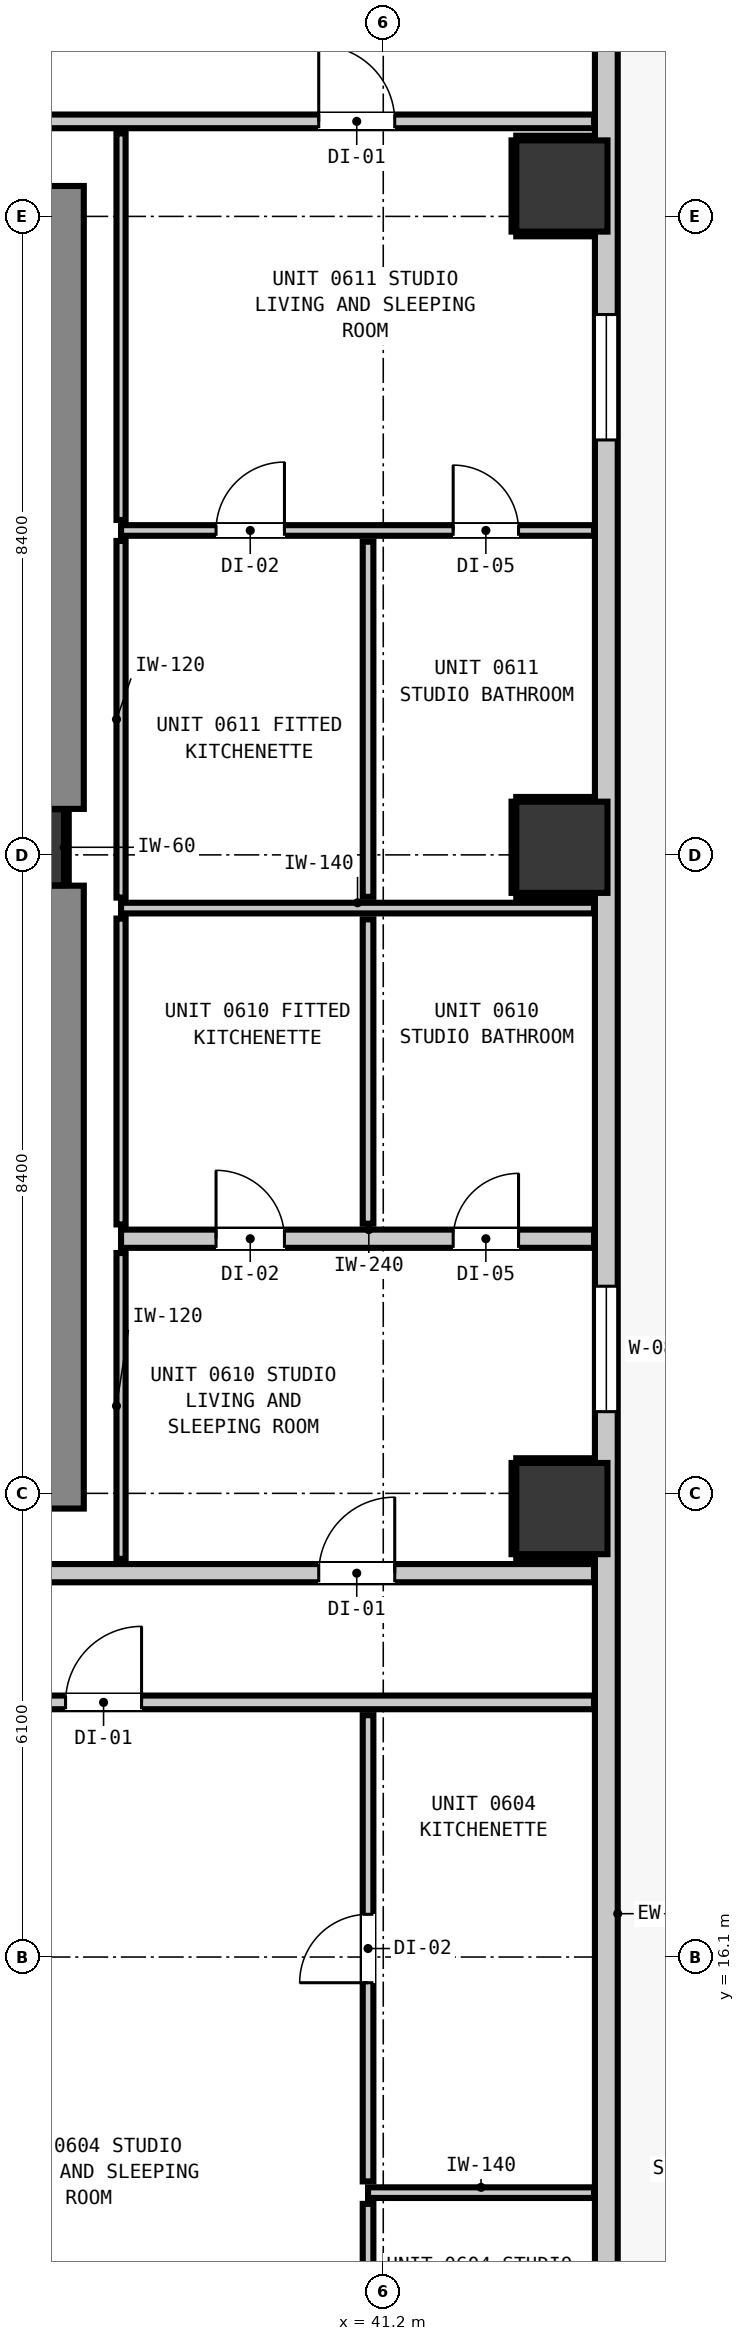
"""IFC4 building model, lengths in metres.
Left out: names, types, materials, properties, quantities, classifications, styles, units other than length and angle.
Written with IfcOpenShell. Run it as: python <this file> out.ifc"""

import sys

from ifc_helpers import new_model, si_unit, direction, frame, frame_2d, origin, origin_2d, place, context, subcontext, project, spatial, rectangle, extrude, element, fill, save


model = new_model("IFC4")
c1 = context("Model", 3, precision=1e-05, world=origin(), true_north=direction((0.0, 1.0)))
c2 = subcontext(c1, "Body", "Model", "MODEL_VIEW")
j1 = project(units=[si_unit("LENGTHUNIT", "METRE"), si_unit("PLANEANGLEUNIT", "RADIAN")], contexts=[c1])
p1 = place(None, origin())
s1 = spatial("IfcSite", under=j1, at=p1, CompositionType="ELEMENT")
p2 = place(p1, origin())
s2 = spatial("IfcBuilding", under=s1, at=p2, CompositionType="ELEMENT")
p3 = place(p2, frame((0.0, 0.0, 25.32)))
s3 = spatial("IfcBuildingStorey", under=s2, at=p3, CompositionType="ELEMENT", Elevation=25.32)
p4 = place(p3, frame((36.5, 30.7, 0.0), z_axis=(0.0, 0.0, 1.0), x_axis=(1.0, 0.0, 0.0)))
e1 = element("IfcColumn", 1, at=p4, inside=s3, PredefinedType="COLUMN", context=c2, shape_type="SweptSolid", body=[
    extrude(rectangle(XDim=1.0, YDim=1.0, at=origin_2d()), origin(), (0.0, 0.0, 1.0), 3.32),
])
p5 = place(p3, frame((36.66, 22.0, 0.0), z_axis=(0.0, 0.0, 1.0), x_axis=(0.0, 1.0, 0.0)))
e2 = element("IfcWall", 2, at=p5, inside=s3, PredefinedType="SHEAR", context=c2, shape_type="SweptSolid", body=[
    extrude(rectangle(XDim=8.195, YDim=1.2, at=frame_2d((4.098, 0.0))), origin(), (0.0, 0.0, 1.0), 3.32),
])
p6 = place(p3, frame((36.66, 31.205, 0.0), z_axis=(0.0, 0.0, 1.0), x_axis=(0.0, 1.0, 0.0)))
e3 = element("IfcWall", 3, at=p6, inside=s3, PredefinedType="SHEAR", context=c2, shape_type="SweptSolid", body=[
    extrude(rectangle(XDim=8.195, YDim=1.2, at=frame_2d((4.097, 0.0))), origin(), (0.0, 0.0, 1.0), 3.32),
])
for number, where, z_axis, x_axis in (
    (4, (43.55, 22.0, 0.0), (0.0, 0.0, 1.0), (1.0, 0.0, 0.0)),
    (5, (43.55, 30.7, 0.0), (0.0, 0.0, 1.0), (1.0, 0.0, 0.0)),
    (6, (43.55, 39.4, 0.0), (0.0, 0.0, 1.0), (1.0, 0.0, 0.0)),
):
    element("IfcColumn", number, at=place(p3, frame(where, z_axis=z_axis, x_axis=x_axis)), inside=s3, PredefinedType="COLUMN", context=c2, shape_type="SweptSolid", body=[
        extrude(rectangle(XDim=1.2, YDim=1.2, at=origin_2d()), origin(), (0.0, 0.0, 1.0), 3.32),
    ])
p7 = place(p3, frame((44.135, 44.835, 0.0), z_axis=(0.0, 0.0, 1.0), x_axis=(0.0, -1.0, 0.0)))
e7 = element("IfcWall", 7, at=p7, inside=s3, PredefinedType="STANDARD", context=c2, shape_type="SweptSolid", body=[
    extrude(rectangle(XDim=34.67, YDim=0.3, at=frame_2d((17.335, 0.0))), origin(), (0.0, 0.0, 1.0), 3.06),
])
p8 = place(p7, frame((0.901, 0.0, 0.0)))
e8 = element("IfcOpeningElement", 8, at=p8, cuts=e7, PredefinedType="OPENING", context=c2, shape_type="SweptSolid", body=[
    extrude(rectangle(XDim=1.0, YDim=2.15, at=frame_2d((0.5, 1.075))), frame((0.0, 0.16, 0.0), z_axis=(0.0, -1.0, 0.0), x_axis=(1.0, 0.0, 0.0)), (0.0, 0.0, 1.0), 0.32),
])
p9 = place(p7, frame((19.91, 0.0, 0.85)))
e9 = element("IfcOpeningElement", 9, at=p9, cuts=e7, PredefinedType="OPENING", context=c2, shape_type="SweptSolid", body=[
    extrude(rectangle(XDim=1.65, YDim=1.75, at=frame_2d((0.825, 0.875))), frame((0.0, 0.16, 0.0), z_axis=(0.0, -1.0, 0.0), x_axis=(1.0, 0.0, 0.0)), (0.0, 0.0, 1.0), 0.32),
])
p10 = place(p7, frame((7.126, 0.0, 0.85)))
e10 = element("IfcOpeningElement", 10, at=p10, cuts=e7, PredefinedType="OPENING", context=c2, shape_type="SweptSolid", body=[
    extrude(rectangle(XDim=1.65, YDim=1.75, at=frame_2d((0.825, 0.875))), frame((0.0, 0.16, 0.0), z_axis=(0.0, -1.0, 0.0), x_axis=(1.0, 0.0, 0.0)), (0.0, 0.0, 1.0), 0.32),
])
p11 = place(p3, frame((1.827, 21.15, 0.0), z_axis=(0.0, 0.0, 1.0), x_axis=(1.0, 0.0, 0.0)))
e11 = element("IfcWall", 11, at=p11, inside=s3, PredefinedType="PARTITIONING", context=c2, shape_type="SweptSolid", body=[
    extrude(rectangle(XDim=42.146, YDim=0.24, at=frame_2d((21.073, 0.0))), origin(), (0.0, 0.0, 1.0), 3.06),
])
p12 = place(p11, frame((16.383, 0.0, 0.0)))
e12 = element("IfcOpeningElement", 12, at=p12, cuts=e11, PredefinedType="OPENING", context=c2, shape_type="SweptSolid", body=[
    extrude(rectangle(XDim=1.1, YDim=2.15, at=frame_2d((0.55, 1.075))), frame((0.0, 0.13, 0.0), z_axis=(0.0, -1.0, 0.0), x_axis=(1.0, 0.0, 0.0)), (0.0, 0.0, 1.0), 0.26),
])
p13 = place(p11, frame((8.647, 0.0, 0.0)))
e13 = element("IfcOpeningElement", 13, at=p13, cuts=e11, PredefinedType="OPENING", context=c2, shape_type="SweptSolid", body=[
    extrude(rectangle(XDim=1.4, YDim=2.15, at=frame_2d((0.7, 1.075))), frame((0.0, 0.13, 0.0), z_axis=(0.0, -1.0, 0.0), x_axis=(1.0, 0.0, 0.0)), (0.0, 0.0, 1.0), 0.26),
])
p14 = place(p11, frame((38.524, 0.0, 0.0)))
e14 = element("IfcOpeningElement", 14, at=p14, cuts=e11, PredefinedType="OPENING", context=c2, shape_type="SweptSolid", body=[
    extrude(rectangle(XDim=1.0, YDim=2.15, at=frame_2d((0.5, 1.075))), frame((0.0, 0.13, 0.0), z_axis=(0.0, -1.0, 0.0), x_axis=(1.0, 0.0, 0.0)), (0.0, 0.0, 1.0), 0.26),
])
p15 = place(p3, frame((37.75, 25.55, 0.0), z_axis=(0.0, 0.0, 1.0), x_axis=(1.0, 0.0, 0.0)))
e15 = element("IfcWall", 15, at=p15, inside=s3, PredefinedType="PARTITIONING", context=c2, shape_type="SweptSolid", body=[
    extrude(rectangle(XDim=6.223, YDim=0.24, at=frame_2d((3.111, 0.0))), origin(), (0.0, 0.0, 1.0), 3.06),
])
p16 = place(p15, frame((1.25, 0.0, 0.0)))
e16 = element("IfcOpeningElement", 16, at=p16, cuts=e15, PredefinedType="OPENING", context=c2, shape_type="SweptSolid", body=[
    extrude(rectangle(XDim=0.9, YDim=2.1, at=frame_2d((0.45, 1.05))), frame((0.0, 0.13, 0.0), z_axis=(0.0, -1.0, 0.0), x_axis=(1.0, 0.0, 0.0)), (0.0, 0.0, 1.0), 0.26),
])
p17 = place(p15, frame((4.37, 0.0, 0.0)))
e17 = element("IfcOpeningElement", 17, at=p17, cuts=e15, PredefinedType="OPENING", context=c2, shape_type="SweptSolid", body=[
    extrude(rectangle(XDim=0.86, YDim=2.02, at=frame_2d((0.43, 1.01))), frame((0.0, 0.13, 0.0), z_axis=(0.0, -1.0, 0.0), x_axis=(1.0, 0.0, 0.0)), (0.0, 0.0, 1.0), 0.26),
])
p18 = place(p3, frame((1.827, 19.45, 0.0), z_axis=(0.0, 0.0, 1.0), x_axis=(1.0, 0.0, 0.0)))
e18 = element("IfcWall", 18, at=p18, inside=s3, PredefinedType="PARTITIONING", context=c2, shape_type="SweptSolid", body=[
    extrude(rectangle(XDim=42.146, YDim=0.18, at=frame_2d((21.073, 0.0))), origin(), (0.0, 0.0, 1.0), 3.06),
])
p19 = place(p18, frame((10.283, 0.0, 0.0)))
e19 = element("IfcOpeningElement", 19, at=p19, cuts=e18, PredefinedType="OPENING", context=c2, shape_type="SweptSolid", body=[
    extrude(rectangle(XDim=1.0, YDim=2.15, at=frame_2d((0.5, 1.075))), frame((0.0, 0.1, 0.0), z_axis=(0.0, -1.0, 0.0), x_axis=(1.0, 0.0, 0.0)), (0.0, 0.0, 1.0), 0.2),
])
p20 = place(p18, frame((17.475, 0.0, 0.0)))
e20 = element("IfcOpeningElement", 20, at=p20, cuts=e18, PredefinedType="OPENING", context=c2, shape_type="SweptSolid", body=[
    extrude(rectangle(XDim=1.0, YDim=2.15, at=frame_2d((0.5, 1.075))), frame((0.0, 0.1, 0.0), z_axis=(0.0, -1.0, 0.0), x_axis=(1.0, 0.0, 0.0)), (0.0, 0.0, 1.0), 0.2),
])
p21 = place(p18, frame((25.928, 0.0, 0.0)))
e21 = element("IfcOpeningElement", 21, at=p21, cuts=e18, PredefinedType="OPENING", context=c2, shape_type="SweptSolid", body=[
    extrude(rectangle(XDim=1.0, YDim=2.15, at=frame_2d((0.5, 1.075))), frame((0.0, 0.1, 0.0), z_axis=(0.0, -1.0, 0.0), x_axis=(1.0, 0.0, 0.0)), (0.0, 0.0, 1.0), 0.2),
])
p22 = place(p18, frame((35.193, 0.0, 0.0)))
e22 = element("IfcOpeningElement", 22, at=p22, cuts=e18, PredefinedType="OPENING", context=c2, shape_type="SweptSolid", body=[
    extrude(rectangle(XDim=1.0, YDim=2.15, at=frame_2d((0.5, 1.075))), frame((0.0, 0.1, 0.0), z_axis=(0.0, -1.0, 0.0), x_axis=(1.0, 0.0, 0.0)), (0.0, 0.0, 1.0), 0.2),
])
p23 = place(p3, frame((12.989, 40.25, 0.0), z_axis=(0.0, 0.0, 1.0), x_axis=(1.0, 0.0, 0.0)))
e23 = element("IfcWall", 23, at=p23, inside=s3, PredefinedType="PARTITIONING", context=c2, shape_type="SweptSolid", body=[
    extrude(rectangle(XDim=30.984, YDim=0.18, at=frame_2d((15.492, 0.0))), origin(), (0.0, 0.0, 1.0), 3.06),
])
p24 = place(p23, frame((4.446, 0.0, 0.0)))
e24 = element("IfcOpeningElement", 24, at=p24, cuts=e23, PredefinedType="OPENING", context=c2, shape_type="SweptSolid", body=[
    extrude(rectangle(XDim=1.4, YDim=2.15, at=frame_2d((0.7, 1.075))), frame((0.0, 0.1, 0.0), z_axis=(0.0, -1.0, 0.0), x_axis=(1.0, 0.0, 0.0)), (0.0, 0.0, 1.0), 0.2),
])
p25 = place(p23, frame((27.362, 0.0, 0.0)))
e25 = element("IfcOpeningElement", 25, at=p25, cuts=e23, PredefinedType="OPENING", context=c2, shape_type="SweptSolid", body=[
    extrude(rectangle(XDim=1.0, YDim=2.15, at=frame_2d((0.5, 1.075))), frame((0.0, 0.1, 0.0), z_axis=(0.0, -1.0, 0.0), x_axis=(1.0, 0.0, 0.0)), (0.0, 0.0, 1.0), 0.2),
])
p26 = place(p3, frame((41.0, 13.0, 0.0), z_axis=(0.0, 0.0, 1.0), x_axis=(1.0, 0.0, 0.0)))
e26 = element("IfcWall", 26, at=p26, inside=s3, PredefinedType="PARTITIONING", context=c2, shape_type="SweptSolid", body=[
    extrude(rectangle(XDim=2.973, YDim=0.14, at=frame_2d((1.486, 0.0))), origin(), (0.0, 0.0, 1.0), 3.06),
])
p27 = place(p3, frame((37.75, 29.9, 0.0), z_axis=(0.0, 0.0, 1.0), x_axis=(1.0, 0.0, 0.0)))
e27 = element("IfcWall", 27, at=p27, inside=s3, PredefinedType="PARTITIONING", context=c2, shape_type="SweptSolid", body=[
    extrude(rectangle(XDim=6.223, YDim=0.14, at=frame_2d((3.111, 0.0))), origin(), (0.0, 0.0, 1.0), 3.06),
])
p28 = place(p3, frame((37.75, 34.868, 0.0), z_axis=(0.0, 0.0, 1.0), x_axis=(1.0, 0.0, 0.0)))
e28 = element("IfcWall", 28, at=p28, inside=s3, PredefinedType="PARTITIONING", context=c2, shape_type="SweptSolid", body=[
    extrude(rectangle(XDim=6.223, YDim=0.14, at=frame_2d((3.111, 0.0))), origin(), (0.0, 0.0, 1.0), 3.06),
])
p29 = place(p28, frame((1.25, 0.0, 0.0)))
e29 = element("IfcOpeningElement", 29, at=p29, cuts=e28, PredefinedType="OPENING", context=c2, shape_type="SweptSolid", body=[
    extrude(rectangle(XDim=0.9, YDim=2.1, at=frame_2d((0.45, 1.05))), frame((0.0, 0.08, 0.0), z_axis=(0.0, -1.0, 0.0), x_axis=(1.0, 0.0, 0.0)), (0.0, 0.0, 1.0), 0.16),
])
p30 = place(p28, frame((4.37, 0.0, 0.0)))
e30 = element("IfcOpeningElement", 30, at=p30, cuts=e28, PredefinedType="OPENING", context=c2, shape_type="SweptSolid", body=[
    extrude(rectangle(XDim=0.86, YDim=2.02, at=frame_2d((0.43, 1.01))), frame((0.0, 0.08, 0.0), z_axis=(0.0, -1.0, 0.0), x_axis=(1.0, 0.0, 0.0)), (0.0, 0.0, 1.0), 0.16),
])
p31 = place(p3, frame((41.0, 7.827, 0.0), z_axis=(0.0, 0.0, 1.0), x_axis=(0.0, 1.0, 0.0)))
e31 = element("IfcWall", 31, at=p31, inside=s3, PredefinedType="PARTITIONING", context=c2, shape_type="SweptSolid", body=[
    extrude(rectangle(XDim=5.025, YDim=0.14, at=frame_2d((2.513, 0.0))), origin(), (0.0, 0.0, 1.0), 3.06),
])
p32 = place(p31, frame((2.156, 0.0, 0.0)))
e32 = element("IfcOpeningElement", 32, at=p32, cuts=e31, PredefinedType="OPENING", context=c2, shape_type="SweptSolid", body=[
    extrude(rectangle(XDim=0.86, YDim=2.02, at=frame_2d((0.43, 1.01))), frame((0.0, 0.08, 0.0), z_axis=(0.0, -1.0, 0.0), x_axis=(1.0, 0.0, 0.0)), (0.0, 0.0, 1.0), 0.16),
])
p33 = place(p3, frame((41.0, 13.148, 0.0), z_axis=(0.0, 0.0, 1.0), x_axis=(0.0, 1.0, 0.0)))
e33 = element("IfcWall", 33, at=p33, inside=s3, PredefinedType="PARTITIONING", context=c2, shape_type="SweptSolid", body=[
    extrude(rectangle(XDim=6.134, YDim=0.14, at=frame_2d((3.067, 0.0))), origin(), (0.0, 0.0, 1.0), 2.445),
])
p34 = place(p33, frame((2.614, 0.0, 0.0)))
e34 = element("IfcOpeningElement", 34, at=p34, cuts=e33, PredefinedType="OPENING", context=c2, shape_type="SweptSolid", body=[
    extrude(rectangle(XDim=0.9, YDim=2.1, at=frame_2d((0.45, 1.05))), frame((0.0, 0.08, 0.0), z_axis=(0.0, -1.0, 0.0), x_axis=(1.0, 0.0, 0.0)), (0.0, 0.0, 1.0), 0.16),
])
p35 = place(p3, frame((41.0, 25.748, 0.0), z_axis=(0.0, 0.0, 1.0), x_axis=(0.0, 1.0, 0.0)))
e35 = element("IfcWall", 35, at=p35, inside=s3, PredefinedType="PARTITIONING", context=c2, shape_type="SweptSolid", body=[
    extrude(rectangle(XDim=4.004, YDim=0.14, at=frame_2d((2.002, 0.0))), origin(), (0.0, 0.0, 1.0), 3.06),
])
p36 = place(p3, frame((41.0, 30.048, 0.0), z_axis=(0.0, 0.0, 1.0), x_axis=(0.0, 1.0, 0.0)))
e36 = element("IfcWall", 36, at=p36, inside=s3, PredefinedType="PARTITIONING", context=c2, shape_type="SweptSolid", body=[
    extrude(rectangle(XDim=4.672, YDim=0.14, at=frame_2d((2.336, 0.0))), origin(), (0.0, 0.0, 1.0), 3.06),
])
p37 = place(p3, frame((37.75, 21.338, 0.0), z_axis=(0.0, 0.0, 1.0), x_axis=(0.0, 1.0, 0.0)))
e37 = element("IfcWall", 37, at=p37, inside=s3, PredefinedType="PARTITIONING", context=c2, shape_type="SweptSolid", body=[
    extrude(rectangle(XDim=4.024, YDim=0.12, at=frame_2d((2.012, 0.0))), origin(), (0.0, 0.0, 1.0), 3.06),
])
p38 = place(p3, frame((37.75, 25.738, 0.0), z_axis=(0.0, 0.0, 1.0), x_axis=(0.0, 1.0, 0.0)))
e38 = element("IfcWall", 38, at=p38, inside=s3, PredefinedType="PARTITIONING", context=c2, shape_type="SweptSolid", body=[
    extrude(rectangle(XDim=4.024, YDim=0.12, at=frame_2d((2.012, 0.0))), origin(), (0.0, 0.0, 1.0), 3.06),
])
p39 = place(p3, frame((37.75, 30.038, 0.0), z_axis=(0.0, 0.0, 1.0), x_axis=(0.0, 1.0, 0.0)))
e39 = element("IfcWall", 39, at=p39, inside=s3, PredefinedType="PARTITIONING", context=c2, shape_type="SweptSolid", body=[
    extrude(rectangle(XDim=4.692, YDim=0.12, at=frame_2d((2.346, 0.0))), origin(), (0.0, 0.0, 1.0), 3.06),
])
p40 = place(p3, frame((37.75, 35.006, 0.0), z_axis=(0.0, 0.0, 1.0), x_axis=(0.0, 1.0, 0.0)))
e40 = element("IfcWall", 40, at=p40, inside=s3, PredefinedType="PARTITIONING", context=c2, shape_type="SweptSolid", body=[
    extrude(rectangle(XDim=5.086, YDim=0.12, at=frame_2d((2.543, 0.0))), origin(), (0.0, 0.0, 1.0), 3.06),
])
p41 = place(p3, frame((37.032, 30.21, 0.0), z_axis=(0.0, 0.0, 1.0), x_axis=(0.0, 1.0, 0.0)))
e41 = element("IfcWall", 41, at=p41, inside=s3, PredefinedType="PARTITIONING", context=c2, shape_type="SweptSolid", body=[
    extrude(rectangle(XDim=0.98, YDim=0.06, at=frame_2d((0.49, 0.0))), origin(), (0.0, 0.0, 1.0), 1.45),
])
for number, where, z_axis, x_axis in (
    (42, (42.95, 21.368, 0.0), (0.0, 0.0, 1.0), (1.0, 0.0, 0.0)),
    (43, (42.95, 22.632, 0.0), (0.0, 0.0, 1.0), (1.0, 0.0, 0.0)),
):
    element("IfcWall", number, at=place(p3, frame(where, z_axis=z_axis, x_axis=x_axis)), inside=s3, PredefinedType="PARTITIONING", context=c2, shape_type="SweptSolid", body=[
        extrude(rectangle(XDim=1.02, YDim=0.06, at=frame_2d((0.51, 0.0))), origin(), (0.0, 0.0, 1.0), 1.45),
    ])
p42 = place(p3, frame((42.918, 21.4, 0.0), z_axis=(0.0, 0.0, 1.0), x_axis=(0.0, 1.0, 0.0)))
e44 = element("IfcWall", 44, at=p42, inside=s3, PredefinedType="PARTITIONING", context=c2, shape_type="SweptSolid", body=[
    extrude(rectangle(XDim=1.2, YDim=0.06, at=frame_2d((0.6, 0.0))), origin(), (0.0, 0.0, 1.0), 1.45),
])
for number, where, z_axis, x_axis in (
    (45, (42.95, 30.068, 0.0), (0.0, 0.0, 1.0), (1.0, 0.0, 0.0)),
    (46, (42.95, 31.332, 0.0), (0.0, 0.0, 1.0), (1.0, 0.0, 0.0)),
):
    element("IfcWall", number, at=place(p3, frame(where, z_axis=z_axis, x_axis=x_axis)), inside=s3, PredefinedType="PARTITIONING", context=c2, shape_type="SweptSolid", body=[
        extrude(rectangle(XDim=1.02, YDim=0.06, at=frame_2d((0.51, 0.0))), origin(), (0.0, 0.0, 1.0), 1.45),
    ])
p43 = place(p3, frame((42.918, 30.1, 0.0), z_axis=(0.0, 0.0, 1.0), x_axis=(0.0, 1.0, 0.0)))
e47 = element("IfcWall", 47, at=p43, inside=s3, PredefinedType="PARTITIONING", context=c2, shape_type="SweptSolid", body=[
    extrude(rectangle(XDim=1.2, YDim=0.06, at=frame_2d((0.6, 0.0))), origin(), (0.0, 0.0, 1.0), 1.45),
])
for number, where, z_axis, x_axis in (
    (48, (42.95, 38.768, 0.0), (0.0, 0.0, 1.0), (1.0, 0.0, 0.0)),
    (49, (42.95, 40.032, 0.0), (0.0, 0.0, 1.0), (1.0, 0.0, 0.0)),
):
    element("IfcWall", number, at=place(p3, frame(where, z_axis=z_axis, x_axis=x_axis)), inside=s3, PredefinedType="PARTITIONING", context=c2, shape_type="SweptSolid", body=[
        extrude(rectangle(XDim=1.02, YDim=0.06, at=frame_2d((0.51, 0.0))), origin(), (0.0, 0.0, 1.0), 1.45),
    ])
p44 = place(p3, frame((42.918, 38.8, 0.0), z_axis=(0.0, 0.0, 1.0), x_axis=(0.0, 1.0, 0.0)))
e50 = element("IfcWall", 50, at=p44, inside=s3, PredefinedType="PARTITIONING", context=c2, shape_type="SweptSolid", body=[
    extrude(rectangle(XDim=1.2, YDim=0.06, at=frame_2d((0.6, 0.0))), origin(), (0.0, 0.0, 1.0), 1.45),
])
p45 = place(p9, origin())
e51 = element("IfcWindow", 51, at=p45, inside=s3, PartitioningType="SINGLE_PANEL", PredefinedType="WINDOW", context=c2, shape_type="SweptSolid", body=[
    extrude(rectangle(XDim=1.65, YDim=1.75, at=frame_2d((0.825, 0.875))), frame((0.0, 0.03, 0.0), z_axis=(0.0, -1.0, 0.0), x_axis=(1.0, 0.0, 0.0)), (0.0, 0.0, 1.0), 0.06),
])
fill(e9, e51)
p46 = place(p10, origin())
e52 = element("IfcWindow", 52, at=p46, inside=s3, PartitioningType="SINGLE_PANEL", PredefinedType="WINDOW", context=c2, shape_type="SweptSolid", body=[
    extrude(rectangle(XDim=1.65, YDim=1.75, at=frame_2d((0.825, 0.875))), frame((0.0, 0.03, 0.0), z_axis=(0.0, -1.0, 0.0), x_axis=(1.0, 0.0, 0.0)), (0.0, 0.0, 1.0), 0.06),
])
fill(e10, e52)
p47 = place(p22, origin())
e53 = element("IfcDoor", 53, at=p47, inside=s3, OperationType="SINGLE_SWING_RIGHT", PredefinedType="DOOR", context=c2, shape_type="SweptSolid", body=[
    extrude(rectangle(XDim=1.0, YDim=2.15, at=frame_2d((0.5, 1.075))), frame((0.0, 0.025, 0.0), z_axis=(0.0, -1.0, 0.0), x_axis=(1.0, 0.0, 0.0)), (0.0, 0.0, 1.0), 0.05),
])
fill(e22, e53)
p48 = place(p34, origin())
e54 = element("IfcDoor", 54, at=p48, inside=s3, OperationType="SINGLE_SWING_LEFT", PredefinedType="DOOR", context=c2, shape_type="SweptSolid", body=[
    extrude(rectangle(XDim=0.9, YDim=2.1, at=frame_2d((0.45, 1.05))), frame((0.0, 0.025, 0.0), z_axis=(0.0, -1.0, 0.0), x_axis=(1.0, 0.0, 0.0)), (0.0, 0.0, 1.0), 0.05),
])
fill(e34, e54)
p49 = place(p14, origin())
e55 = element("IfcDoor", 55, at=p49, inside=s3, OperationType="SINGLE_SWING_RIGHT", PredefinedType="DOOR", context=c2, shape_type="SweptSolid", body=[
    extrude(rectangle(XDim=1.0, YDim=2.15, at=frame_2d((0.5, 1.075))), frame((0.0, 0.025, 0.0), z_axis=(0.0, -1.0, 0.0), x_axis=(1.0, 0.0, 0.0)), (0.0, 0.0, 1.0), 0.05),
])
fill(e14, e55)
p50 = place(p16, origin())
e56 = element("IfcDoor", 56, at=p50, inside=s3, OperationType="SINGLE_SWING_LEFT", PredefinedType="DOOR", context=c2, shape_type="SweptSolid", body=[
    extrude(rectangle(XDim=0.9, YDim=2.1, at=frame_2d((0.45, 1.05))), frame((0.0, 0.025, 0.0), z_axis=(0.0, -1.0, 0.0), x_axis=(1.0, 0.0, 0.0)), (0.0, 0.0, 1.0), 0.05),
])
fill(e16, e56)
p51 = place(p17, origin())
e57 = element("IfcDoor", 57, at=p51, inside=s3, OperationType="SINGLE_SWING_RIGHT", PredefinedType="DOOR", context=c2, shape_type="SweptSolid", body=[
    extrude(rectangle(XDim=0.86, YDim=2.02, at=frame_2d((0.43, 1.01))), frame((0.0, 0.025, 0.0), z_axis=(0.0, -1.0, 0.0), x_axis=(1.0, 0.0, 0.0)), (0.0, 0.0, 1.0), 0.05),
])
fill(e17, e57)
p52 = place(p25, origin())
e58 = element("IfcDoor", 58, at=p52, inside=s3, OperationType="SINGLE_SWING_LEFT", PredefinedType="DOOR", context=c2, shape_type="SweptSolid", body=[
    extrude(rectangle(XDim=1.0, YDim=2.15, at=frame_2d((0.5, 1.075))), frame((0.0, 0.025, 0.0), z_axis=(0.0, -1.0, 0.0), x_axis=(1.0, 0.0, 0.0)), (0.0, 0.0, 1.0), 0.05),
])
fill(e25, e58)
p53 = place(p29, origin())
e59 = element("IfcDoor", 59, at=p53, inside=s3, OperationType="SINGLE_SWING_RIGHT", PredefinedType="DOOR", context=c2, shape_type="SweptSolid", body=[
    extrude(rectangle(XDim=0.9, YDim=2.1, at=frame_2d((0.45, 1.05))), frame((0.0, 0.025, 0.0), z_axis=(0.0, -1.0, 0.0), x_axis=(1.0, 0.0, 0.0)), (0.0, 0.0, 1.0), 0.05),
])
fill(e29, e59)
p54 = place(p30, origin())
e60 = element("IfcDoor", 60, at=p54, inside=s3, OperationType="SINGLE_SWING_LEFT", PredefinedType="DOOR", context=c2, shape_type="SweptSolid", body=[
    extrude(rectangle(XDim=0.86, YDim=2.02, at=frame_2d((0.43, 1.01))), frame((0.0, 0.025, 0.0), z_axis=(0.0, -1.0, 0.0), x_axis=(1.0, 0.0, 0.0)), (0.0, 0.0, 1.0), 0.05),
])
fill(e30, e60)
save(model, sys.argv[1])
